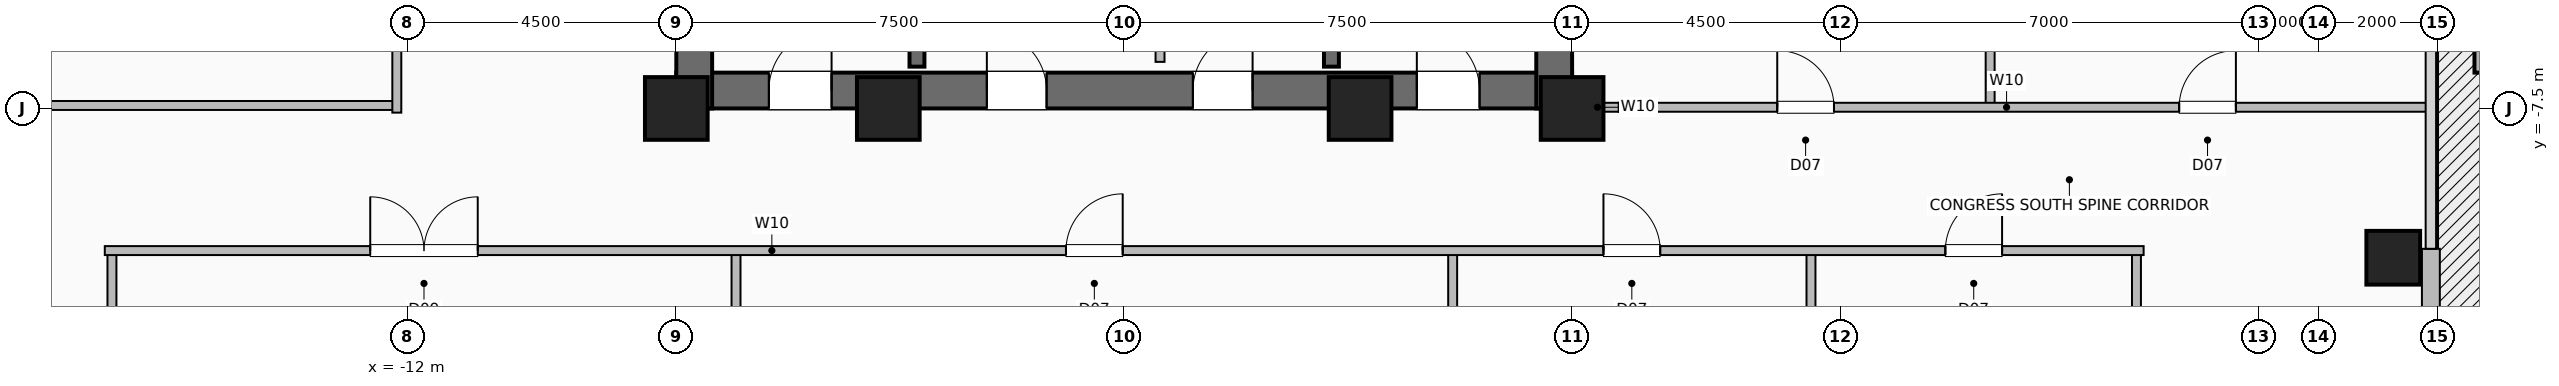
"""IFC4 building model, lengths in metres.
Left out: names, types, materials, properties, quantities, classifications, styles, units other than length and angle.
Written with IfcOpenShell. Run it as: python <this file> out.ifc"""

import sys

from ifc_helpers import new_model, si_unit, direction, frame, frame_2d, origin, origin_2d, place, context, subcontext, project, spatial, rectangle, hollow_rectangle, extrude, element, fill, save


model = new_model("IFC4")
c1 = context("Model", 3, precision=1e-05, world=origin(), true_north=direction((0.0, 1.0)))
c2 = subcontext(c1, "Body", "Model", "MODEL_VIEW")
j1 = project(units=[si_unit("LENGTHUNIT", "METRE"), si_unit("PLANEANGLEUNIT", "RADIAN")], contexts=[c1])
p1 = place(None, origin())
s1 = spatial("IfcSite", under=j1, at=p1, CompositionType="ELEMENT")
p2 = place(p1, origin())
s2 = spatial("IfcBuilding", under=s1, at=p2, CompositionType="ELEMENT")
p3 = place(p2, frame((0.0, 0.0, 122.8)))
s3 = spatial("IfcBuildingStorey", under=s2, at=p3, CompositionType="ELEMENT", Elevation=122.8)
for number, where, z_axis, x_axis in (
    (1, (-7.5, -7.5, 0.0), (0.0, 0.0, 1.0), (1.0, 0.0, 0.0)),
    (2, (-3.95, -7.5, 0.0), (0.0, 0.0, 1.0), (1.0, 0.0, 0.0)),
    (3, (3.95, -7.5, 0.0), (0.0, 0.0, 1.0), (1.0, 0.0, 0.0)),
    (4, (7.5, -7.5, 0.0), (0.0, 0.0, 1.0), (1.0, 0.0, 0.0)),
):
    element("IfcColumn", number, at=place(p3, frame(where, z_axis=z_axis, x_axis=x_axis)), inside=s3, PredefinedType="COLUMN", context=c2, shape_type="SweptSolid", body=[
        extrude(hollow_rectangle(XDim=1.05, YDim=1.05, WallThickness=0.05, at=origin_2d()), origin(), (0.0, 0.0, 1.0), 3.6),
    ])
p4 = place(p3, frame((21.25, -10.0, 0.0), z_axis=(0.0, 0.0, 1.0), x_axis=(1.0, 0.0, 0.0)))
e5 = element("IfcColumn", 5, at=p4, inside=s3, PredefinedType="COLUMN", context=c2, shape_type="SweptSolid", body=[
    extrude(hollow_rectangle(XDim=0.9, YDim=0.9, WallThickness=0.045, at=origin_2d()), origin(), (0.0, 0.0, 1.0), 3.6),
])
p5 = place(p3, frame((21.88, -16.15, 0.0), z_axis=(0.0, 0.0, 1.0), x_axis=(0.0, 1.0, 0.0)))
e6 = element("IfcWall", 6, at=p5, inside=s3, PredefinedType="SOLIDWALL", context=c2, shape_type="SweptSolid", body=[
    extrude(rectangle(XDim=6.3, YDim=0.3, at=frame_2d((3.15, 0.0))), origin(), (0.0, 0.0, 1.0), 3.36),
])
p6 = place(p3, frame((-7.5, -7.2, 0.0), z_axis=(0.0, 0.0, 1.0), x_axis=(1.0, 0.0, 0.0)))
e7 = element("IfcWall", 7, at=p6, inside=s3, PredefinedType="SHEAR", context=c2, shape_type="SweptSolid", body=[
    extrude(rectangle(XDim=15.0, YDim=0.6, at=frame_2d((7.5, 0.0))), origin(), (0.0, 0.0, 1.0), 3.36),
])
p7 = place(p6, frame((1.55, 0.0, 0.0)))
e8 = element("IfcOpeningElement", 8, at=p7, cuts=e7, PredefinedType="OPENING", context=c2, shape_type="SweptSolid", body=[
    extrude(rectangle(XDim=1.05, YDim=2.08, at=frame_2d((0.525, 1.04))), frame((0.0, 0.31, 0.0), z_axis=(0.0, -1.0, 0.0), x_axis=(1.0, 0.0, 0.0)), (0.0, 0.0, 1.0), 0.62),
])
p8 = place(p6, frame((12.4, 0.0, 0.0)))
e9 = element("IfcOpeningElement", 9, at=p8, cuts=e7, PredefinedType="OPENING", context=c2, shape_type="SweptSolid", body=[
    extrude(rectangle(XDim=1.05, YDim=2.08, at=frame_2d((0.525, 1.04))), frame((0.0, 0.31, 0.0), z_axis=(0.0, -1.0, 0.0), x_axis=(1.0, 0.0, 0.0)), (0.0, 0.0, 1.0), 0.62),
])
p9 = place(p6, frame((5.2, 0.0, 0.0)))
e10 = element("IfcOpeningElement", 10, at=p9, cuts=e7, PredefinedType="OPENING", context=c2, shape_type="SweptSolid", body=[
    extrude(rectangle(XDim=1.0, YDim=2.08, at=frame_2d((0.5, 1.04))), frame((0.0, 0.31, 0.0), z_axis=(0.0, -1.0, 0.0), x_axis=(1.0, 0.0, 0.0)), (0.0, 0.0, 1.0), 0.62),
])
p10 = place(p6, frame((8.65, 0.0, 0.0)))
e11 = element("IfcOpeningElement", 11, at=p10, cuts=e7, PredefinedType="OPENING", context=c2, shape_type="SweptSolid", body=[
    extrude(rectangle(XDim=1.0, YDim=2.08, at=frame_2d((0.5, 1.04))), frame((0.0, 0.31, 0.0), z_axis=(0.0, -1.0, 0.0), x_axis=(1.0, 0.0, 0.0)), (0.0, 0.0, 1.0), 0.62),
])
p11 = place(p3, frame((-7.2, -7.5, 0.0), z_axis=(0.0, 0.0, 1.0), x_axis=(0.0, 1.0, 0.0)))
e12 = element("IfcWall", 12, at=p11, inside=s3, PredefinedType="SHEAR", context=c2, shape_type="SweptSolid", body=[
    extrude(rectangle(XDim=15.0, YDim=0.6, at=frame_2d((7.5, 0.0))), origin(), (0.0, 0.0, 1.0), 3.36),
])
p12 = place(p11, frame((9.5, 0.0, 0.0)))
e13 = element("IfcOpeningElement", 13, at=p12, cuts=e12, PredefinedType="OPENING", context=c2, shape_type="SweptSolid", body=[
    extrude(rectangle(XDim=1.0, YDim=2.08, at=frame_2d((0.5, 1.04))), frame((0.0, 0.31, 0.0), z_axis=(0.0, -1.0, 0.0), x_axis=(1.0, 0.0, 0.0)), (0.0, 0.0, 1.0), 0.62),
])
p13 = place(p3, frame((7.2, -7.5, 0.0), z_axis=(0.0, 0.0, 1.0), x_axis=(0.0, 1.0, 0.0)))
e14 = element("IfcWall", 14, at=p13, inside=s3, PredefinedType="SHEAR", context=c2, shape_type="SweptSolid", body=[
    extrude(rectangle(XDim=15.0, YDim=0.6, at=frame_2d((7.5, 0.0))), origin(), (0.0, 0.0, 1.0), 3.36),
])
for number, where, z_axis, x_axis in (
    (15, (-3.47, -6.8, 0.0), (0.0, 0.0, 1.0), (0.0, 1.0, 0.0)),
    (16, (3.47, -6.8, 0.0), (0.0, 0.0, 1.0), (0.0, 1.0, 0.0)),
):
    element("IfcWall", number, at=place(p3, frame(where, z_axis=z_axis, x_axis=x_axis)), inside=s3, PredefinedType="SHEAR", context=c2, shape_type="SweptSolid", body=[
        extrude(rectangle(XDim=7.72, YDim=0.25, at=frame_2d((3.86, 0.0))), origin(), (0.0, 0.0, 1.0), 3.36),
    ])
p14 = place(p3, frame((0.6, -6.72, 0.0), z_axis=(0.0, 0.0, 1.0), x_axis=(0.0, 1.0, 0.0)))
e17 = element("IfcWall", 17, at=p14, inside=s3, PredefinedType="PARTITIONING", context=c2, shape_type="SweptSolid", body=[
    extrude(rectangle(XDim=4.29, YDim=0.15, at=frame_2d((2.145, 0.0))), origin(), (0.0, 0.0, 1.0), 3.36),
])
for number, where, z_axis, x_axis in (
    (18, (-16.95, -21.82, 0.0), (0.0, 0.0, 1.0), (0.0, 1.0, 0.0)),
    (19, (-6.5, -21.82, 0.0), (0.0, 0.0, 1.0), (0.0, 1.0, 0.0)),
    (20, (5.5, -21.82, 0.0), (0.0, 0.0, 1.0), (0.0, 1.0, 0.0)),
    (21, (11.5, -21.82, 0.0), (0.0, 0.0, 1.0), (0.0, 1.0, 0.0)),
    (22, (16.95, -21.82, 0.0), (0.0, 0.0, 1.0), (0.0, 1.0, 0.0)),
):
    element("IfcWall", number, at=place(p3, frame(where, z_axis=z_axis, x_axis=x_axis)), inside=s3, PredefinedType="PARTITIONING", context=c2, shape_type="SweptSolid", body=[
        extrude(rectangle(XDim=11.94, YDim=0.15, at=frame_2d((5.97, 0.0))), origin(), (0.0, 0.0, 1.0), 3.36),
    ])
p15 = place(p3, frame((-17.07, -9.88, 0.0), z_axis=(0.0, 0.0, 1.0), x_axis=(1.0, 0.0, 0.0)))
e23 = element("IfcWall", 23, at=p15, inside=s3, PredefinedType="PARTITIONING", context=c2, shape_type="SweptSolid", body=[
    extrude(rectangle(XDim=34.14, YDim=0.15, at=frame_2d((17.07, 0.0))), origin(), (0.0, 0.0, 1.0), 3.36),
])
p16 = place(p15, frame((4.445, 0.0, 0.0)))
e24 = element("IfcOpeningElement", 24, at=p16, cuts=e23, PredefinedType="OPENING", context=c2, shape_type="SweptSolid", body=[
    extrude(rectangle(XDim=1.8, YDim=2.08, at=frame_2d((0.9, 1.04))), frame((0.0, 0.085, 0.0), z_axis=(0.0, -1.0, 0.0), x_axis=(1.0, 0.0, 0.0)), (0.0, 0.0, 1.0), 0.17),
])
p17 = place(p15, frame((16.095, 0.0, 0.0)))
e25 = element("IfcOpeningElement", 25, at=p17, cuts=e23, PredefinedType="OPENING", context=c2, shape_type="SweptSolid", body=[
    extrude(rectangle(XDim=0.95, YDim=2.06, at=frame_2d((0.475, 1.03))), frame((0.0, 0.085, 0.0), z_axis=(0.0, -1.0, 0.0), x_axis=(1.0, 0.0, 0.0)), (0.0, 0.0, 1.0), 0.17),
])
p18 = place(p15, frame((25.095, 0.0, 0.0)))
e26 = element("IfcOpeningElement", 26, at=p18, cuts=e23, PredefinedType="OPENING", context=c2, shape_type="SweptSolid", body=[
    extrude(rectangle(XDim=0.95, YDim=2.06, at=frame_2d((0.475, 1.03))), frame((0.0, 0.085, 0.0), z_axis=(0.0, -1.0, 0.0), x_axis=(1.0, 0.0, 0.0)), (0.0, 0.0, 1.0), 0.17),
])
p19 = place(p15, frame((30.82, 0.0, 0.0)))
e27 = element("IfcOpeningElement", 27, at=p19, cuts=e23, PredefinedType="OPENING", context=c2, shape_type="SweptSolid", body=[
    extrude(rectangle(XDim=0.95, YDim=2.06, at=frame_2d((0.475, 1.03))), frame((0.0, 0.085, 0.0), z_axis=(0.0, -1.0, 0.0), x_axis=(1.0, 0.0, 0.0)), (0.0, 0.0, 1.0), 0.17),
])
p20 = place(p3, frame((-21.82, -7.45, 0.0), z_axis=(0.0, 0.0, 1.0), x_axis=(1.0, 0.0, 0.0)))
e28 = element("IfcWall", 28, at=p20, inside=s3, PredefinedType="PARTITIONING", context=c2, shape_type="SweptSolid", body=[
    extrude(rectangle(XDim=9.64, YDim=0.15, at=frame_2d((4.82, 0.0))), origin(), (0.0, 0.0, 1.0), 3.36),
])
p21 = place(p3, frame((-12.18, -7.57, 0.0), z_axis=(0.0, 0.0, 1.0), x_axis=(0.0, 1.0, 0.0)))
e29 = element("IfcWall", 29, at=p21, inside=s3, PredefinedType="PARTITIONING", context=c2, shape_type="SweptSolid", body=[
    extrude(rectangle(XDim=15.14, YDim=0.15, at=frame_2d((7.57, 0.0))), origin(), (0.0, 0.0, 1.0), 3.36),
])
p22 = place(p21, frame((3.695, 0.0, 0.0)))
e30 = element("IfcOpeningElement", 30, at=p22, cuts=e29, PredefinedType="OPENING", context=c2, shape_type="SweptSolid", body=[
    extrude(rectangle(XDim=1.8, YDim=2.08, at=frame_2d((0.9, 1.04))), frame((0.0, 0.085, 0.0), z_axis=(0.0, -1.0, 0.0), x_axis=(1.0, 0.0, 0.0)), (0.0, 0.0, 1.0), 0.17),
])
p23 = place(p21, frame((11.57, 0.0, 0.0)))
e31 = element("IfcOpeningElement", 31, at=p23, cuts=e29, PredefinedType="OPENING", context=c2, shape_type="SweptSolid", body=[
    extrude(rectangle(XDim=0.95, YDim=2.06, at=frame_2d((0.475, 1.03))), frame((0.0, 0.085, 0.0), z_axis=(0.0, -1.0, 0.0), x_axis=(1.0, 0.0, 0.0)), (0.0, 0.0, 1.0), 0.17),
])
p24 = place(p3, frame((7.45, -7.48, 0.0), z_axis=(0.0, 0.0, 1.0), x_axis=(1.0, 0.0, 0.0)))
e32 = element("IfcWall", 32, at=p24, inside=s3, PredefinedType="PARTITIONING", context=c2, shape_type="SweptSolid", body=[
    extrude(rectangle(XDim=0.95, YDim=0.15, at=frame_2d((0.475, 0.0))), origin(), (0.0, 0.0, 1.0), 3.36),
])
p25 = place(p3, frame((14.5, -7.48, 0.0), z_axis=(0.0, 0.0, 1.0), x_axis=(0.0, 1.0, 0.0)))
e33 = element("IfcWall", 33, at=p25, inside=s3, PredefinedType="PARTITIONING", context=c2, shape_type="SweptSolid", body=[
    extrude(rectangle(XDim=14.88, YDim=0.15, at=frame_2d((7.44, 0.0))), origin(), (0.0, 0.0, 1.0), 3.36),
])
p26 = place(p3, frame((8.28, -7.48, 0.0), z_axis=(0.0, 0.0, 1.0), x_axis=(1.0, 0.0, 0.0)))
e34 = element("IfcWall", 34, at=p26, inside=s3, PredefinedType="PARTITIONING", context=c2, shape_type="SweptSolid", body=[
    extrude(rectangle(XDim=13.54, YDim=0.15, at=frame_2d((6.77, 0.0))), origin(), (0.0, 0.0, 1.0), 3.36),
])
p27 = place(p26, frame((2.655, 0.0, 0.0)))
e35 = element("IfcOpeningElement", 35, at=p27, cuts=e34, PredefinedType="OPENING", context=c2, shape_type="SweptSolid", body=[
    extrude(rectangle(XDim=0.95, YDim=2.06, at=frame_2d((0.475, 1.03))), frame((0.0, 0.085, 0.0), z_axis=(0.0, -1.0, 0.0), x_axis=(1.0, 0.0, 0.0)), (0.0, 0.0, 1.0), 0.17),
])
p28 = place(p26, frame((9.385, 0.0, 0.0)))
e36 = element("IfcOpeningElement", 36, at=p28, cuts=e34, PredefinedType="OPENING", context=c2, shape_type="SweptSolid", body=[
    extrude(rectangle(XDim=0.95, YDim=2.06, at=frame_2d((0.475, 1.03))), frame((0.0, 0.085, 0.0), z_axis=(0.0, -1.0, 0.0), x_axis=(1.0, 0.0, 0.0)), (0.0, 0.0, 1.0), 0.17),
])
p29 = place(p7, origin())
e37 = element("IfcDoor", 37, at=p29, inside=s3, OperationType="SINGLE_SWING_RIGHT", PredefinedType="DOOR", context=c2, shape_type="SweptSolid", body=[
    extrude(rectangle(XDim=1.05, YDim=2.08, at=frame_2d((0.525, 1.04))), frame((0.0, 0.025, 0.0), z_axis=(0.0, -1.0, 0.0), x_axis=(1.0, 0.0, 0.0)), (0.0, 0.0, 1.0), 0.05),
])
fill(e8, e37)
p30 = place(p8, origin())
e38 = element("IfcDoor", 38, at=p30, inside=s3, OperationType="SINGLE_SWING_LEFT", PredefinedType="DOOR", context=c2, shape_type="SweptSolid", body=[
    extrude(rectangle(XDim=1.05, YDim=2.08, at=frame_2d((0.525, 1.04))), frame((0.0, 0.025, 0.0), z_axis=(0.0, -1.0, 0.0), x_axis=(1.0, 0.0, 0.0)), (0.0, 0.0, 1.0), 0.05),
])
fill(e9, e38)
p31 = place(p9, origin())
e39 = element("IfcDoor", 39, at=p31, inside=s3, OperationType="SINGLE_SWING_LEFT", PredefinedType="DOOR", context=c2, shape_type="SweptSolid", body=[
    extrude(rectangle(XDim=1.0, YDim=2.08, at=frame_2d((0.5, 1.04))), frame((0.0, 0.025, 0.0), z_axis=(0.0, -1.0, 0.0), x_axis=(1.0, 0.0, 0.0)), (0.0, 0.0, 1.0), 0.05),
])
fill(e10, e39)
p32 = place(p10, origin())
e40 = element("IfcDoor", 40, at=p32, inside=s3, OperationType="SINGLE_SWING_RIGHT", PredefinedType="DOOR", context=c2, shape_type="SweptSolid", body=[
    extrude(rectangle(XDim=1.0, YDim=2.08, at=frame_2d((0.5, 1.04))), frame((0.0, 0.025, 0.0), z_axis=(0.0, -1.0, 0.0), x_axis=(1.0, 0.0, 0.0)), (0.0, 0.0, 1.0), 0.05),
])
fill(e11, e40)
p33 = place(p16, origin())
e41 = element("IfcDoor", 41, at=p33, inside=s3, OperationType="DOUBLE_DOOR_SINGLE_SWING", PredefinedType="DOOR", context=c2, shape_type="SweptSolid", body=[
    extrude(rectangle(XDim=1.8, YDim=2.08, at=frame_2d((0.9, 1.04))), frame((0.0, 0.025, 0.0), z_axis=(0.0, -1.0, 0.0), x_axis=(1.0, 0.0, 0.0)), (0.0, 0.0, 1.0), 0.05),
])
fill(e24, e41)
p34 = place(p17, origin())
e42 = element("IfcDoor", 42, at=p34, inside=s3, OperationType="SINGLE_SWING_RIGHT", PredefinedType="DOOR", context=c2, shape_type="SweptSolid", body=[
    extrude(rectangle(XDim=0.95, YDim=2.06, at=frame_2d((0.475, 1.03))), frame((0.0, 0.025, 0.0), z_axis=(0.0, -1.0, 0.0), x_axis=(1.0, 0.0, 0.0)), (0.0, 0.0, 1.0), 0.05),
])
fill(e25, e42)
p35 = place(p18, origin())
e43 = element("IfcDoor", 43, at=p35, inside=s3, OperationType="SINGLE_SWING_LEFT", PredefinedType="DOOR", context=c2, shape_type="SweptSolid", body=[
    extrude(rectangle(XDim=0.95, YDim=2.06, at=frame_2d((0.475, 1.03))), frame((0.0, 0.025, 0.0), z_axis=(0.0, -1.0, 0.0), x_axis=(1.0, 0.0, 0.0)), (0.0, 0.0, 1.0), 0.05),
])
fill(e26, e43)
p36 = place(p19, origin())
e44 = element("IfcDoor", 44, at=p36, inside=s3, OperationType="SINGLE_SWING_RIGHT", PredefinedType="DOOR", context=c2, shape_type="SweptSolid", body=[
    extrude(rectangle(XDim=0.95, YDim=2.06, at=frame_2d((0.475, 1.03))), frame((0.0, 0.025, 0.0), z_axis=(0.0, -1.0, 0.0), x_axis=(1.0, 0.0, 0.0)), (0.0, 0.0, 1.0), 0.05),
])
fill(e27, e44)
p37 = place(p27, origin())
e45 = element("IfcDoor", 45, at=p37, inside=s3, OperationType="SINGLE_SWING_LEFT", PredefinedType="DOOR", context=c2, shape_type="SweptSolid", body=[
    extrude(rectangle(XDim=0.95, YDim=2.06, at=frame_2d((0.475, 1.03))), frame((0.0, 0.025, 0.0), z_axis=(0.0, -1.0, 0.0), x_axis=(1.0, 0.0, 0.0)), (0.0, 0.0, 1.0), 0.05),
])
fill(e35, e45)
p38 = place(p28, origin())
e46 = element("IfcDoor", 46, at=p38, inside=s3, OperationType="SINGLE_SWING_RIGHT", PredefinedType="DOOR", context=c2, shape_type="SweptSolid", body=[
    extrude(rectangle(XDim=0.95, YDim=2.06, at=frame_2d((0.475, 1.03))), frame((0.0, 0.025, 0.0), z_axis=(0.0, -1.0, 0.0), x_axis=(1.0, 0.0, 0.0)), (0.0, 0.0, 1.0), 0.05),
])
fill(e36, e46)
save(model, sys.argv[1])
